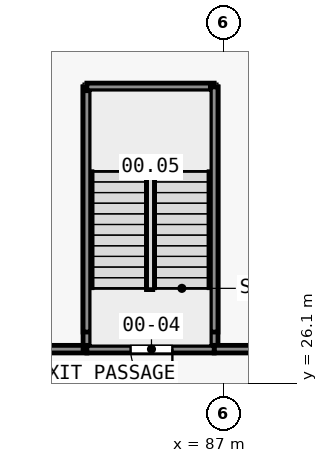
"""IFC4 building model, lengths in metres.
Left out: names, types, materials, properties, quantities, classifications, styles, units other than length and angle.
Written with IfcOpenShell. Run it as: python <this file> out.ifc"""

import sys

from ifc_helpers import new_model, si_unit, direction, frame, frame_2d, origin, place, context, subcontext, project, spatial, rectangle, extrude, element, fill, save


model = new_model("IFC4")
c1 = context("Model", 3, precision=1e-05, world=origin(), true_north=direction((0.0, 1.0)))
c2 = subcontext(c1, "Body", "Model", "MODEL_VIEW")
j1 = project(units=[si_unit("LENGTHUNIT", "METRE"), si_unit("PLANEANGLEUNIT", "RADIAN")], contexts=[c1])
p1 = place(None, origin())
s1 = spatial("IfcSite", under=j1, at=p1, CompositionType="ELEMENT")
p2 = place(p1, origin())
s2 = spatial("IfcBuilding", under=s1, at=p2, CompositionType="ELEMENT")
p3 = place(p2, origin())
s3 = spatial("IfcBuildingStorey", under=s2, at=p3, CompositionType="ELEMENT", Elevation=0.0)
p4 = place(p3, frame((81.7, 27.0, 0.0), z_axis=(0.0, 0.0, 1.0), x_axis=(1.0, 0.0, 0.0)))
e1 = element("IfcWall", 1, at=p4, inside=s3, PredefinedType="PARTITIONING", context=c2, shape_type="SweptSolid", body=[
    extrude(rectangle(XDim=1.7, YDim=0.2, at=frame_2d((0.85, 0.0))), origin(), (0.0, 0.0, 1.0), 6.95),
])
p5 = place(p3, frame((83.4, 27.0, 0.0), z_axis=(0.0, 0.0, 1.0), x_axis=(0.0, 1.0, 0.0)))
e2 = element("IfcWall", 2, at=p5, inside=s3, PredefinedType="PARTITIONING", context=c2, shape_type="SweptSolid", body=[
    extrude(rectangle(XDim=6.9, YDim=0.2, at=frame_2d((3.45, 0.0))), origin(), (0.0, 0.0, 1.0), 6.95),
])
p6 = place(p3, frame((83.4, 33.9, 0.0), z_axis=(0.0, 0.0, 1.0), x_axis=(1.0, 0.0, 0.0)))
e3 = element("IfcWall", 3, at=p6, inside=s3, PredefinedType="PARTITIONING", context=c2, shape_type="SweptSolid", body=[
    extrude(rectangle(XDim=3.35, YDim=0.2, at=frame_2d((1.675, 0.0))), origin(), (0.0, 0.0, 1.0), 7.65),
])
p7 = place(p3, frame((86.75, 33.9, 0.0), z_axis=(0.0, 0.0, 1.0), x_axis=(0.0, -1.0, 0.0)))
e4 = element("IfcWall", 4, at=p7, inside=s3, PredefinedType="PARTITIONING", context=c2, shape_type="SweptSolid", body=[
    extrude(rectangle(XDim=6.9, YDim=0.2, at=frame_2d((3.45, 0.0))), origin(), (0.0, 0.0, 1.0), 6.95),
])
p8 = place(p3, frame((86.75, 27.0, 0.0), z_axis=(0.0, 0.0, 1.0), x_axis=(1.0, 0.0, 0.0)))
e5 = element("IfcWall", 5, at=p8, inside=s3, PredefinedType="PARTITIONING", context=c2, shape_type="SweptSolid", body=[
    extrude(rectangle(XDim=2.55, YDim=0.2, at=frame_2d((1.275, 0.0))), origin(), (0.0, 0.0, 1.0), 6.95),
])
p9 = place(p3, frame((86.75, 27.0, 0.0), z_axis=(0.0, 0.0, 1.0), x_axis=(-1.0, 0.0, 0.0)))
e6 = element("IfcWall", 6, at=p9, inside=s3, PredefinedType="PARTITIONING", context=c2, shape_type="SweptSolid", body=[
    extrude(rectangle(XDim=3.35, YDim=0.2, at=frame_2d((1.675, 0.0))), origin(), (0.0, 0.0, 1.0), 6.95),
])
p10 = place(p9, frame((1.1, 0.0, 0.0)))
e7 = element("IfcOpeningElement", 7, at=p10, cuts=e6, PredefinedType="OPENING", context=c2, shape_type="SweptSolid", body=[
    extrude(rectangle(XDim=1.1, YDim=2.1, at=frame_2d((0.55, 1.05))), frame((0.0, 0.11, 0.0), z_axis=(0.0, -1.0, 0.0), x_axis=(1.0, 0.0, 0.0)), (0.0, 0.0, 1.0), 0.22),
])
for number, where, z_axis, x_axis in (
    (8, (83.4, 27.45, 6.95), (0.0, 0.0, 1.0), (0.0, 1.0, 0.0)),
    (9, (86.75, 33.9, 6.95), (0.0, 0.0, 1.0), (0.0, -1.0, 0.0)),
):
    element("IfcWall", number, at=place(p3, frame(where, z_axis=z_axis, x_axis=x_axis)), inside=s3, PredefinedType="PARTITIONING", context=c2, shape_type="SweptSolid", body=[
        extrude(rectangle(XDim=6.45, YDim=0.2, at=frame_2d((3.225, 0.0))), origin(), (0.0, 0.0, 1.0), 0.7),
    ])
p11 = place(p10, origin())
e10 = element("IfcDoor", 10, at=p11, inside=s3, OperationType="SINGLE_SWING_LEFT", PredefinedType="DOOR", context=c2, shape_type="SweptSolid", body=[
    extrude(rectangle(XDim=1.1, YDim=2.1, at=frame_2d((0.55, 1.05))), frame((0.0, 0.025, 0.0), z_axis=(0.0, -1.0, 0.0), x_axis=(1.0, 0.0, 0.0)), (0.0, 0.0, 1.0), 0.05),
])
fill(e7, e10)
save(model, sys.argv[1])
